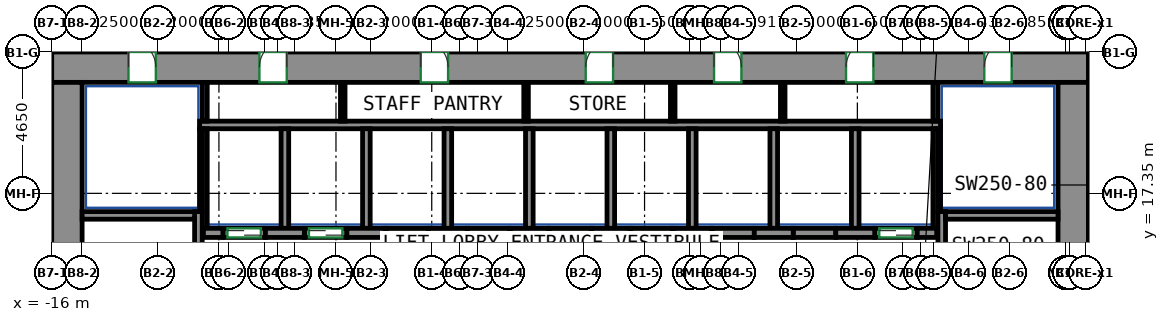
"""IFC4 building model, lengths in metres.
Left out: names, types, materials, properties, quantities, classifications, styles, units other than length and angle.
Written with IfcOpenShell. Run it as: python <this file> out.ifc"""

import sys

from ifc_helpers import new_model, si_unit, direction, frame, frame_2d, origin, place, context, subcontext, project, spatial, rectangle, extrude, source, transform, mapped, element, fill, save


model = new_model("IFC4")
c1 = context("Model", 3, precision=1e-05, world=origin(), true_north=direction((0.0, 1.0)))
c2 = subcontext(c1, "Body", "Model", "MODEL_VIEW")
j1 = project(units=[si_unit("LENGTHUNIT", "METRE"), si_unit("PLANEANGLEUNIT", "RADIAN")], contexts=[c1])
p1 = place(None, origin())
s1 = spatial("IfcSite", under=j1, at=p1, CompositionType="ELEMENT")
p2 = place(p1, origin())
s2 = spatial("IfcBuilding", under=s1, at=p2, CompositionType="ELEMENT")
p3 = place(p2, frame((0.0, 0.0, 9.0)))
s3 = spatial("IfcBuildingStorey", under=s2, at=p3, CompositionType="ELEMENT", Elevation=9.0)
m1 = source(origin(), c2, "Body", "SweptSolid", [
    extrude(rectangle(XDim=34.1, YDim=1.0, at=frame_2d((17.05, 0.0))), origin(), (0.0, 0.0, 1.0), 4.1),
])
p4 = place(p3, frame((-16.0, 21.5, 0.0), z_axis=(0.0, 0.0, 1.0), x_axis=(1.0, 0.0, 0.0)))
e1 = element("IfcWall", 1, at=p4, inside=s3, PredefinedType="SHEAR", context=c2, shape_type="MappedRepresentation", body=[
    mapped(m1, transform((0.0, 0.0, 0.0))),
])
p5 = place(p4, frame((6.831, 0.0, 0.0)))
e2 = element("IfcOpeningElement", 2, at=p5, cuts=e1, PredefinedType="OPENING", context=c2, shape_type="SweptSolid", body=[
    extrude(rectangle(XDim=0.9, YDim=2.1, at=frame_2d((0.45, 1.05))), frame((0.0, 0.51, 0.0), z_axis=(0.0, -1.0, 0.0), x_axis=(1.0, 0.0, 0.0)), (0.0, 0.0, 1.0), 1.02),
])
p6 = place(p4, frame((12.138, 0.0, 0.0)))
e3 = element("IfcOpeningElement", 3, at=p6, cuts=e1, PredefinedType="OPENING", context=c2, shape_type="SweptSolid", body=[
    extrude(rectangle(XDim=0.9, YDim=2.1, at=frame_2d((0.45, 1.05))), frame((0.0, 0.51, 0.0), z_axis=(0.0, -1.0, 0.0), x_axis=(1.0, 0.0, 0.0)), (0.0, 0.0, 1.0), 1.02),
])
p7 = place(p4, frame((17.565, 0.0, 0.0)))
e4 = element("IfcOpeningElement", 4, at=p7, cuts=e1, PredefinedType="OPENING", context=c2, shape_type="SweptSolid", body=[
    extrude(rectangle(XDim=0.9, YDim=2.1, at=frame_2d((0.45, 1.05))), frame((0.0, 0.51, 0.0), z_axis=(0.0, -1.0, 0.0), x_axis=(1.0, 0.0, 0.0)), (0.0, 0.0, 1.0), 1.02),
])
p8 = place(p4, frame((21.786, 0.0, 0.0)))
e5 = element("IfcOpeningElement", 5, at=p8, cuts=e1, PredefinedType="OPENING", context=c2, shape_type="SweptSolid", body=[
    extrude(rectangle(XDim=0.9, YDim=2.1, at=frame_2d((0.45, 1.05))), frame((0.0, 0.51, 0.0), z_axis=(0.0, -1.0, 0.0), x_axis=(1.0, 0.0, 0.0)), (0.0, 0.0, 1.0), 1.02),
])
p9 = place(p4, frame((26.127, 0.0, 0.0)))
e6 = element("IfcOpeningElement", 6, at=p9, cuts=e1, PredefinedType="OPENING", context=c2, shape_type="SweptSolid", body=[
    extrude(rectangle(XDim=0.9, YDim=2.1, at=frame_2d((0.45, 1.05))), frame((0.0, 0.51, 0.0), z_axis=(0.0, -1.0, 0.0), x_axis=(1.0, 0.0, 0.0)), (0.0, 0.0, 1.0), 1.02),
])
p10 = place(p4, frame((2.525, 0.0, 0.0)))
e7 = element("IfcOpeningElement", 7, at=p10, cuts=e1, PredefinedType="OPENING", context=c2, shape_type="SweptSolid", body=[
    extrude(rectangle(XDim=0.9, YDim=2.1, at=frame_2d((0.45, 1.05))), frame((0.0, 0.51, 0.0), z_axis=(0.0, -1.0, 0.0), x_axis=(1.0, 0.0, 0.0)), (0.0, 0.0, 1.0), 1.02),
])
p11 = place(p4, frame((30.675, 0.0, 0.0)))
e8 = element("IfcOpeningElement", 8, at=p11, cuts=e1, PredefinedType="OPENING", context=c2, shape_type="SweptSolid", body=[
    extrude(rectangle(XDim=0.9, YDim=2.1, at=frame_2d((0.45, 1.05))), frame((0.0, 0.51, 0.0), z_axis=(0.0, -1.0, 0.0), x_axis=(1.0, 0.0, 0.0)), (0.0, 0.0, 1.0), 1.02),
])
m2 = source(origin(), c2, "Body", "SweptSolid", [
    extrude(rectangle(XDim=12.0, YDim=1.0, at=frame_2d((6.0, 0.0))), origin(), (0.0, 0.0, 1.0), 4.1),
])
for number, where, z_axis, x_axis in (
    (9, (-15.5, 9.0, 0.0), (0.0, 0.0, 1.0), (0.0, 1.0, 0.0)),
    (10, (17.6, 9.0, 0.0), (0.0, 0.0, 1.0), (0.0, 1.0, 0.0)),
):
    element("IfcWall", number, at=place(p3, frame(where, z_axis=z_axis, x_axis=x_axis)), inside=s3, PredefinedType="SHEAR", context=c2, shape_type="MappedRepresentation", body=[
        mapped(m2, transform((0.0, 0.0, 0.0))),
    ])
m3 = source(origin(), c2, "Body", "SweptSolid", [
    extrude(rectangle(XDim=7.75, YDim=0.25, at=frame_2d((3.875, 0.0))), origin(), (0.0, 0.0, 1.0), 4.1),
])
p12 = place(p3, frame((-11.175, 9.0, 0.0), z_axis=(0.0, 0.0, 1.0), x_axis=(0.0, 1.0, 0.0)))
e11 = element("IfcWall", 11, at=p12, inside=s3, PredefinedType="SHEAR", context=c2, shape_type="MappedRepresentation", body=[
    mapped(m3, transform((0.0, 0.0, 0.0))),
])
m4 = source(origin(), c2, "Body", "SweptSolid", [
    extrude(rectangle(XDim=3.7, YDim=0.25, at=frame_2d((1.85, 0.0))), origin(), (0.0, 0.0, 1.0), 4.1),
])
p13 = place(p3, frame((-15.0, 16.625, 0.0), z_axis=(0.0, 0.0, 1.0), x_axis=(1.0, 0.0, 0.0)))
e12 = element("IfcWall", 12, at=p13, inside=s3, PredefinedType="SHEAR", context=c2, shape_type="MappedRepresentation", body=[
    mapped(m4, transform((0.0, 0.0, 0.0))),
])
p14 = place(p3, frame((13.275, 9.0, 0.0), z_axis=(0.0, 0.0, 1.0), x_axis=(0.0, 1.0, 0.0)))
e13 = element("IfcWall", 13, at=p14, inside=s3, PredefinedType="SHEAR", context=c2, shape_type="MappedRepresentation", body=[
    mapped(m3, transform((0.0, 0.0, 0.0))),
])
m5 = source(origin(), c2, "Body", "SweptSolid", [
    extrude(rectangle(XDim=3.7, YDim=0.25, at=frame_2d((1.85, 0.0))), origin(), (0.0, 0.0, 1.0), 4.1),
])
p15 = place(p3, frame((13.4, 16.625, 0.0), z_axis=(0.0, 0.0, 1.0), x_axis=(1.0, 0.0, 0.0)))
e14 = element("IfcWall", 14, at=p15, inside=s3, PredefinedType="SHEAR", context=c2, shape_type="MappedRepresentation", body=[
    mapped(m5, transform((0.0, 0.0, 0.0))),
])
m6 = source(origin(), c2, "Body", "SweptSolid", [
    extrude(rectangle(XDim=0.64, YDim=0.3, at=frame_2d((0.32, 0.0))), origin(), (0.0, 0.0, 1.0), 4.1),
])
p16 = place(p3, frame((-11.01, 16.05, 0.0), z_axis=(0.0, 0.0, 1.0), x_axis=(1.0, 0.0, 0.0)))
e15 = element("IfcWall", 15, at=p16, inside=s3, PredefinedType="SHEAR", context=c2, shape_type="MappedRepresentation", body=[
    mapped(m6, transform((0.0, 0.0, 0.0))),
])
m7 = source(origin(), c2, "Body", "SweptSolid", [
    extrude(rectangle(XDim=1.28, YDim=0.3, at=frame_2d((0.64, 0.0))), origin(), (0.0, 0.0, 1.0), 4.1),
])
for number, where, z_axis, x_axis in (
    (16, (-8.97, 16.05, 0.0), (0.0, 0.0, 1.0), (1.0, 0.0, 0.0)),
    (17, (-6.29, 16.05, 0.0), (0.0, 0.0, 1.0), (1.0, 0.0, 0.0)),
    (18, (-3.61, 16.05, 0.0), (0.0, 0.0, 1.0), (1.0, 0.0, 0.0)),
    (19, (-0.93, 16.05, 0.0), (0.0, 0.0, 1.0), (1.0, 0.0, 0.0)),
    (20, (1.75, 16.05, 0.0), (0.0, 0.0, 1.0), (1.0, 0.0, 0.0)),
    (21, (4.43, 16.05, 0.0), (0.0, 0.0, 1.0), (1.0, 0.0, 0.0)),
):
    element("IfcWall", number, at=place(p3, frame(where, z_axis=z_axis, x_axis=x_axis)), inside=s3, PredefinedType="SHEAR", context=c2, shape_type="MappedRepresentation", body=[
        mapped(m7, transform((0.0, 0.0, 0.0))),
    ])
m8 = source(origin(), c2, "Body", "SweptSolid", [
    extrude(rectangle(XDim=1.28, YDim=0.3, at=frame_2d((0.64, 0.0))), origin(), (0.0, 0.0, 1.0), 4.1),
])
p17 = place(p3, frame((7.11, 16.05, 0.0), z_axis=(0.0, 0.0, 1.0), x_axis=(1.0, 0.0, 0.0)))
e22 = element("IfcWall", 22, at=p17, inside=s3, PredefinedType="SHEAR", context=c2, shape_type="MappedRepresentation", body=[
    mapped(m8, transform((0.0, 0.0, 0.0))),
])
p18 = place(p3, frame((9.79, 16.05, 0.0), z_axis=(0.0, 0.0, 1.0), x_axis=(1.0, 0.0, 0.0)))
e23 = element("IfcWall", 23, at=p18, inside=s3, PredefinedType="SHEAR", context=c2, shape_type="MappedRepresentation", body=[
    mapped(m7, transform((0.0, 0.0, 0.0))),
])
m9 = source(origin(), c2, "Body", "SweptSolid", [
    extrude(rectangle(XDim=0.64, YDim=0.3, at=frame_2d((0.32, 0.0))), origin(), (0.0, 0.0, 1.0), 4.1),
])
p19 = place(p3, frame((12.47, 16.05, 0.0), z_axis=(0.0, 0.0, 1.0), x_axis=(1.0, 0.0, 0.0)))
e24 = element("IfcWall", 24, at=p19, inside=s3, PredefinedType="SHEAR", context=c2, shape_type="MappedRepresentation", body=[
    mapped(m9, transform((0.0, 0.0, 0.0))),
])
m10 = source(origin(), c2, "Body", "SweptSolid", [
    extrude(rectangle(XDim=1.4, YDim=0.3, at=frame_2d((0.7, 0.0))), origin(), (0.0, 0.0, 1.0), 4.1),
])
p20 = place(p3, frame((11.07, 16.05, 0.0), z_axis=(0.0, 0.0, 1.0), x_axis=(1.0, 0.0, 0.0)))
e25 = element("IfcWall", 25, at=p20, inside=s3, PredefinedType="PARTITIONING", context=c2, shape_type="MappedRepresentation", body=[
    mapped(m10, transform((0.0, 0.0, 0.0))),
])
p21 = place(p20, frame((0.15, 0.0, 0.0)))
e26 = element("IfcOpeningElement", 26, at=p21, cuts=e25, PredefinedType="OPENING", context=c2, shape_type="SweptSolid", body=[
    extrude(rectangle(XDim=1.1, YDim=2.1, at=frame_2d((0.55, 1.05))), frame((0.0, 0.16, 0.0), z_axis=(0.0, -1.0, 0.0), x_axis=(1.0, 0.0, 0.0)), (0.0, 0.0, 1.0), 0.32),
])
m11 = source(origin(), c2, "Body", "SweptSolid", [
    extrude(rectangle(XDim=1.4, YDim=0.3, at=frame_2d((0.7, 0.0))), origin(), (0.0, 0.0, 1.0), 4.1),
])
p22 = place(p3, frame((-10.37, 16.05, 0.0), z_axis=(0.0, 0.0, 1.0), x_axis=(1.0, 0.0, 0.0)))
e27 = element("IfcWall", 27, at=p22, inside=s3, PredefinedType="PARTITIONING", context=c2, shape_type="MappedRepresentation", body=[
    mapped(m11, transform((0.0, 0.0, 0.0))),
])
p23 = place(p22, frame((0.15, 0.0, 0.0)))
e28 = element("IfcOpeningElement", 28, at=p23, cuts=e27, PredefinedType="OPENING", context=c2, shape_type="SweptSolid", body=[
    extrude(rectangle(XDim=1.1, YDim=2.1, at=frame_2d((0.55, 1.05))), frame((0.0, 0.16, 0.0), z_axis=(0.0, -1.0, 0.0), x_axis=(1.0, 0.0, 0.0)), (0.0, 0.0, 1.0), 0.32),
])
p24 = place(p3, frame((-7.69, 16.05, 0.0), z_axis=(0.0, 0.0, 1.0), x_axis=(1.0, 0.0, 0.0)))
e29 = element("IfcWall", 29, at=p24, inside=s3, PredefinedType="PARTITIONING", context=c2, shape_type="MappedRepresentation", body=[
    mapped(m10, transform((0.0, 0.0, 0.0))),
])
p25 = place(p24, frame((0.15, 0.0, 0.0)))
e30 = element("IfcOpeningElement", 30, at=p25, cuts=e29, PredefinedType="OPENING", context=c2, shape_type="SweptSolid", body=[
    extrude(rectangle(XDim=1.1, YDim=2.1, at=frame_2d((0.55, 1.05))), frame((0.0, 0.16, 0.0), z_axis=(0.0, -1.0, 0.0), x_axis=(1.0, 0.0, 0.0)), (0.0, 0.0, 1.0), 0.32),
])
p26 = place(p3, frame((-5.01, 16.05, 0.0), z_axis=(0.0, 0.0, 1.0), x_axis=(1.0, 0.0, 0.0)))
e31 = element("IfcWall", 31, at=p26, inside=s3, PredefinedType="PARTITIONING", context=c2, shape_type="MappedRepresentation", body=[
    mapped(m10, transform((0.0, 0.0, 0.0))),
])
p27 = place(p3, frame((-2.33, 16.05, 0.0), z_axis=(0.0, 0.0, 1.0), x_axis=(1.0, 0.0, 0.0)))
e32 = element("IfcWall", 32, at=p27, inside=s3, PredefinedType="PARTITIONING", context=c2, shape_type="MappedRepresentation", body=[
    mapped(m11, transform((0.0, 0.0, 0.0))),
])
for number, where, z_axis, x_axis in (
    (33, (0.35, 16.05, 0.0), (0.0, 0.0, 1.0), (1.0, 0.0, 0.0)),
    (34, (3.03, 16.05, 0.0), (0.0, 0.0, 1.0), (1.0, 0.0, 0.0)),
):
    element("IfcWall", number, at=place(p3, frame(where, z_axis=z_axis, x_axis=x_axis)), inside=s3, PredefinedType="PARTITIONING", context=c2, shape_type="MappedRepresentation", body=[
        mapped(m10, transform((0.0, 0.0, 0.0))),
    ])
for number, where, z_axis, x_axis in (
    (35, (5.71, 16.05, 0.0), (0.0, 0.0, 1.0), (1.0, 0.0, 0.0)),
    (36, (8.39, 16.05, 0.0), (0.0, 0.0, 1.0), (1.0, 0.0, 0.0)),
):
    element("IfcWall", number, at=place(p3, frame(where, z_axis=z_axis, x_axis=x_axis)), inside=s3, PredefinedType="PARTITIONING", context=c2, shape_type="MappedRepresentation", body=[
        mapped(m11, transform((0.0, 0.0, 0.0))),
    ])
m12 = source(origin(), c2, "Body", "SweptSolid", [
    extrude(rectangle(XDim=24.37, YDim=0.25, at=frame_2d((12.185, 0.0))), origin(), (0.0, 0.0, 1.0), 4.1),
])
p28 = place(p3, frame((-11.135, 19.6, 0.0), z_axis=(0.0, 0.0, 1.0), x_axis=(1.0, 0.0, 0.0)))
e37 = element("IfcWall", 37, at=p28, inside=s3, PredefinedType="PARTITIONING", context=c2, shape_type="MappedRepresentation", body=[
    mapped(m12, transform((0.0, 0.0, 0.0))),
])
m13 = source(origin(), c2, "Body", "SweptSolid", [
    extrude(rectangle(XDim=3.275, YDim=0.165, at=frame_2d((1.638, 0.0))), origin(), (0.0, 0.0, 1.0), 4.1),
])
p29 = place(p3, frame((13.067, 16.2, 0.0), z_axis=(0.0, 0.0, 1.0), x_axis=(0.0, 1.0, 0.0)))
e38 = element("IfcWall", 38, at=p29, inside=s3, PredefinedType="PARTITIONING", context=c2, shape_type="MappedRepresentation", body=[
    mapped(m13, transform((0.0, 0.0, 0.0))),
])
m14 = source(origin(), c2, "Body", "SweptSolid", [
    extrude(rectangle(XDim=1.275, YDim=0.165, at=frame_2d((0.637, 0.0))), origin(), (0.0, 0.0, 1.0), 4.1),
])
p30 = place(p3, frame((13.067, 19.725, 0.0), z_axis=(0.0, 0.0, 1.0), x_axis=(0.0, 1.0, 0.0)))
e39 = element("IfcWall", 39, at=p30, inside=s3, PredefinedType="PARTITIONING", context=c2, shape_type="MappedRepresentation", body=[
    mapped(m14, transform((0.0, 0.0, 0.0))),
])
p31 = place(p3, frame((-10.968, 16.2, 0.0), z_axis=(0.0, 0.0, 1.0), x_axis=(0.0, 1.0, 0.0)))
e40 = element("IfcWall", 40, at=p31, inside=s3, PredefinedType="PARTITIONING", context=c2, shape_type="MappedRepresentation", body=[
    mapped(m13, transform((0.0, 0.0, 0.0))),
])
p32 = place(p3, frame((-10.968, 19.725, 0.0), z_axis=(0.0, 0.0, 1.0), x_axis=(0.0, 1.0, 0.0)))
e41 = element("IfcWall", 41, at=p32, inside=s3, PredefinedType="PARTITIONING", context=c2, shape_type="MappedRepresentation", body=[
    mapped(m14, transform((0.0, 0.0, 0.0))),
])
m15 = source(origin(), c2, "Body", "SweptSolid", [
    extrude(rectangle(XDim=3.275, YDim=0.25, at=frame_2d((1.638, 0.0))), origin(), (0.0, 0.0, 1.0), 4.1),
])
p33 = place(p3, frame((10.43, 16.2, 0.0), z_axis=(0.0, 0.0, 1.0), x_axis=(0.0, 1.0, 0.0)))
e42 = element("IfcWall", 42, at=p33, inside=s3, PredefinedType="PARTITIONING", context=c2, shape_type="MappedRepresentation", body=[
    mapped(m15, transform((0.0, 0.0, 0.0))),
])
m16 = source(origin(), c2, "Body", "SweptSolid", [
    extrude(rectangle(XDim=2.725, YDim=0.085, at=frame_2d((1.363, 0.0))), origin(), (0.0, 0.0, 1.0), 4.1),
])
p34 = place(p3, frame((13.192, 16.75, 0.0), z_axis=(0.0, 0.0, 1.0), x_axis=(0.0, 1.0, 0.0)))
e43 = element("IfcWall", 43, at=p34, inside=s3, PredefinedType="PARTITIONING", context=c2, shape_type="MappedRepresentation", body=[
    mapped(m16, transform((0.0, 0.0, 0.0))),
])
for number, where, z_axis, x_axis in (
    (44, (2.39, 16.2, 0.0), (0.0, 0.0, 1.0), (0.0, 1.0, 0.0)),
    (45, (5.07, 16.2, 0.0), (0.0, 0.0, 1.0), (0.0, 1.0, 0.0)),
    (46, (7.75, 16.2, 0.0), (0.0, 0.0, 1.0), (0.0, 1.0, 0.0)),
    (47, (-0.29, 16.2, 0.0), (0.0, 0.0, 1.0), (0.0, 1.0, 0.0)),
):
    element("IfcWall", number, at=place(p3, frame(where, z_axis=z_axis, x_axis=x_axis)), inside=s3, PredefinedType="PARTITIONING", context=c2, shape_type="MappedRepresentation", body=[
        mapped(m15, transform((0.0, 0.0, 0.0))),
    ])
p35 = place(p3, frame((-11.093, 16.75, 0.0), z_axis=(0.0, 0.0, 1.0), x_axis=(0.0, 1.0, 0.0)))
e48 = element("IfcWall", 48, at=p35, inside=s3, PredefinedType="PARTITIONING", context=c2, shape_type="MappedRepresentation", body=[
    mapped(m16, transform((0.0, 0.0, 0.0))),
])
for number, where, z_axis, x_axis in (
    (49, (-2.97, 16.2, 0.0), (0.0, 0.0, 1.0), (0.0, 1.0, 0.0)),
    (50, (-5.65, 16.2, 0.0), (0.0, 0.0, 1.0), (0.0, 1.0, 0.0)),
    (51, (-8.33, 16.2, 0.0), (0.0, 0.0, 1.0), (0.0, 1.0, 0.0)),
):
    element("IfcWall", number, at=place(p3, frame(where, z_axis=z_axis, x_axis=x_axis)), inside=s3, PredefinedType="PARTITIONING", context=c2, shape_type="MappedRepresentation", body=[
        mapped(m15, transform((0.0, 0.0, 0.0))),
    ])
m17 = source(origin(), c2, "Body", "SweptSolid", [
    extrude(rectangle(XDim=1.275, YDim=0.15, at=frame_2d((0.637, 0.0))), origin(), (0.0, 0.0, 1.0), 4.1),
])
for number, where, z_axis, x_axis in (
    (52, (-6.427, 19.725, 0.0), (0.0, 0.0, 1.0), (0.0, 1.0, 0.0)),
    (53, (-0.397, 19.725, 0.0), (0.0, 0.0, 1.0), (0.0, 1.0, 0.0)),
    (54, (4.427, 19.725, 0.0), (0.0, 0.0, 1.0), (0.0, 1.0, 0.0)),
    (55, (8.045, 19.725, 0.0), (0.0, 0.0, 1.0), (0.0, 1.0, 0.0)),
):
    element("IfcWall", number, at=place(p3, frame(where, z_axis=z_axis, x_axis=x_axis)), inside=s3, PredefinedType="PARTITIONING", context=c2, shape_type="MappedRepresentation", body=[
        mapped(m17, transform((0.0, 0.0, 0.0))),
    ])
p36 = place(p21, origin())
e56 = element("IfcDoor", 56, at=p36, inside=s3, OperationType="DOUBLE_DOOR_SLIDING", PredefinedType="DOOR", context=c2, shape_type="SweptSolid", body=[
    extrude(rectangle(XDim=1.1, YDim=2.1, at=frame_2d((0.55, 1.05))), frame((0.0, 0.025, 0.0), z_axis=(0.0, -1.0, 0.0), x_axis=(1.0, 0.0, 0.0)), (0.0, 0.0, 1.0), 0.05),
])
fill(e26, e56)
p37 = place(p23, origin())
e57 = element("IfcDoor", 57, at=p37, inside=s3, OperationType="DOUBLE_DOOR_SLIDING", PredefinedType="DOOR", context=c2, shape_type="SweptSolid", body=[
    extrude(rectangle(XDim=1.1, YDim=2.1, at=frame_2d((0.55, 1.05))), frame((0.0, 0.025, 0.0), z_axis=(0.0, -1.0, 0.0), x_axis=(1.0, 0.0, 0.0)), (0.0, 0.0, 1.0), 0.05),
])
fill(e28, e57)
p38 = place(p25, origin())
e58 = element("IfcDoor", 58, at=p38, inside=s3, OperationType="DOUBLE_DOOR_SLIDING", PredefinedType="DOOR", context=c2, shape_type="SweptSolid", body=[
    extrude(rectangle(XDim=1.1, YDim=2.1, at=frame_2d((0.55, 1.05))), frame((0.0, 0.025, 0.0), z_axis=(0.0, -1.0, 0.0), x_axis=(1.0, 0.0, 0.0)), (0.0, 0.0, 1.0), 0.05),
])
fill(e30, e58)
p39 = place(p5, origin())
e59 = element("IfcDoor", 59, at=p39, inside=s3, OperationType="SINGLE_SWING_RIGHT", PredefinedType="DOOR", context=c2, shape_type="SweptSolid", body=[
    extrude(rectangle(XDim=0.9, YDim=2.1, at=frame_2d((0.45, 1.05))), frame((0.0, -0.355, 0.0), z_axis=(0.0, -1.0, 0.0), x_axis=(1.0, 0.0, 0.0)), (0.0, 0.0, 1.0), 0.05),
])
fill(e2, e59)
p40 = place(p6, origin())
e60 = element("IfcDoor", 60, at=p40, inside=s3, OperationType="SINGLE_SWING_LEFT", PredefinedType="DOOR", context=c2, shape_type="SweptSolid", body=[
    extrude(rectangle(XDim=0.9, YDim=2.1, at=frame_2d((0.45, 1.05))), frame((0.0, -0.355, 0.0), z_axis=(0.0, -1.0, 0.0), x_axis=(1.0, 0.0, 0.0)), (0.0, 0.0, 1.0), 0.05),
])
fill(e3, e60)
p41 = place(p7, origin())
e61 = element("IfcDoor", 61, at=p41, inside=s3, OperationType="SINGLE_SWING_RIGHT", PredefinedType="DOOR", context=c2, shape_type="SweptSolid", body=[
    extrude(rectangle(XDim=0.9, YDim=2.1, at=frame_2d((0.45, 1.05))), frame((0.0, -0.355, 0.0), z_axis=(0.0, -1.0, 0.0), x_axis=(1.0, 0.0, 0.0)), (0.0, 0.0, 1.0), 0.05),
])
fill(e4, e61)
p42 = place(p8, origin())
e62 = element("IfcDoor", 62, at=p42, inside=s3, OperationType="SINGLE_SWING_LEFT", PredefinedType="DOOR", context=c2, shape_type="SweptSolid", body=[
    extrude(rectangle(XDim=0.9, YDim=2.1, at=frame_2d((0.45, 1.05))), frame((0.0, -0.355, 0.0), z_axis=(0.0, -1.0, 0.0), x_axis=(1.0, 0.0, 0.0)), (0.0, 0.0, 1.0), 0.05),
])
fill(e5, e62)
p43 = place(p9, origin())
e63 = element("IfcDoor", 63, at=p43, inside=s3, OperationType="SINGLE_SWING_RIGHT", PredefinedType="DOOR", context=c2, shape_type="SweptSolid", body=[
    extrude(rectangle(XDim=0.9, YDim=2.1, at=frame_2d((0.45, 1.05))), frame((0.0, -0.355, 0.0), z_axis=(0.0, -1.0, 0.0), x_axis=(1.0, 0.0, 0.0)), (0.0, 0.0, 1.0), 0.05),
])
fill(e6, e63)
p44 = place(p10, origin())
e64 = element("IfcDoor", 64, at=p44, inside=s3, OperationType="SINGLE_SWING_LEFT", PredefinedType="DOOR", context=c2, shape_type="SweptSolid", body=[
    extrude(rectangle(XDim=0.9, YDim=2.1, at=frame_2d((0.45, 1.05))), frame((0.0, -0.355, 0.0), z_axis=(0.0, -1.0, 0.0), x_axis=(1.0, 0.0, 0.0)), (0.0, 0.0, 1.0), 0.05),
])
fill(e7, e64)
p45 = place(p11, origin())
e65 = element("IfcDoor", 65, at=p45, inside=s3, OperationType="SINGLE_SWING_RIGHT", PredefinedType="DOOR", context=c2, shape_type="SweptSolid", body=[
    extrude(rectangle(XDim=0.9, YDim=2.1, at=frame_2d((0.45, 1.05))), frame((0.0, -0.355, 0.0), z_axis=(0.0, -1.0, 0.0), x_axis=(1.0, 0.0, 0.0)), (0.0, 0.0, 1.0), 0.05),
])
fill(e8, e65)
save(model, sys.argv[1])
